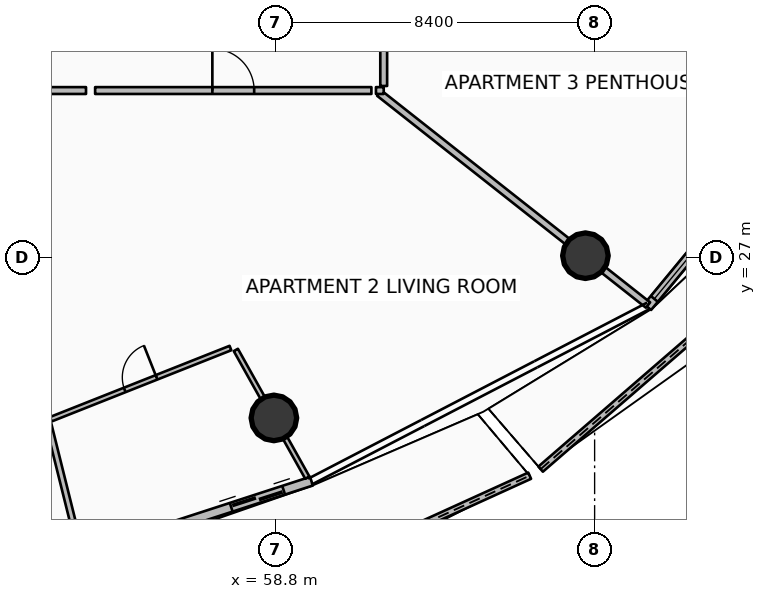
"""IFC4 building model, lengths in metres.
Left out: names, types, materials, properties, quantities, classifications, styles, units other than length and angle.
Written with IfcOpenShell. Run it as: python <this file> out.ifc"""

import sys

from ifc_helpers import new_model, si_unit, direction, frame, frame_2d, origin, origin_2d, place, context, subcontext, project, spatial, polyline, rectangle, circle, outline, extrude, element, fill, save


model = new_model("IFC4")
c1 = context("Model", 3, precision=1e-05, world=origin(), true_north=direction((0.0, 1.0)))
c2 = subcontext(c1, "Body", "Model", "MODEL_VIEW")
j1 = project(units=[si_unit("LENGTHUNIT", "METRE"), si_unit("PLANEANGLEUNIT", "RADIAN")], contexts=[c1])
p1 = place(None, origin())
s1 = spatial("IfcSite", under=j1, at=p1, CompositionType="ELEMENT")
p2 = place(p1, origin())
s2 = spatial("IfcBuilding", under=s1, at=p2, CompositionType="ELEMENT")
p3 = place(p2, frame((0.0, 0.0, 105.15)))
s3 = spatial("IfcBuildingStorey", under=s2, at=p3, CompositionType="ELEMENT", Elevation=105.15)
for number, where, z_axis, x_axis in (
    (1, (58.76, 22.786, 0.0), (0.0, 0.0, 1.0), (1.0, 0.0, 0.0)),
    (2, (66.958, 27.055, 0.0), (0.0, 0.0, 1.0), (1.0, 0.0, 0.0)),
):
    element("IfcColumn", number, at=place(p3, frame(where, z_axis=z_axis, x_axis=x_axis)), inside=s3, PredefinedType="COLUMN", context=c2, shape_type="SweptSolid", body=[
        extrude(circle(Radius=0.6, at=origin_2d()), origin(), (0.0, 0.0, 1.0), 3.5),
    ])
p4 = place(p3, frame((56.231, 17.053, 0.0), z_axis=(0.0, 0.0, 1.0), x_axis=(0.910226702808, 0.41411031078, 0.0)))
e3 = element("IfcWall", 3, at=p4, inside=s3, PredefinedType="PARAPET", context=c2, shape_type="SweptSolid", body=[
    extrude(outline(polyline([(0.0, 0.0), (10.173, 0.0), (10.173, 1.497), (5.086, 1.696), (0.0, 1.832), (0.0, 0.0)])), frame((0.0, 0.09, 0.0), z_axis=(0.0, -1.0, 0.0), x_axis=(1.0, 0.0, 0.0)), (0.0, 0.0, 1.0), 0.18),
])
p5 = place(p3, frame((65.78, 21.438, 0.0), z_axis=(0.0, 0.0, 1.0), x_axis=(0.756090126882, 0.654467508766, 0.0)))
e4 = element("IfcWall", 4, at=p5, inside=s3, PredefinedType="PARAPET", context=c2, shape_type="SweptSolid", body=[
    extrude(outline(polyline([(0.0, 0.0), (10.943, 0.0), (10.943, 1.148), (5.471, 1.284), (0.0, 1.483), (0.0, 0.0)])), frame((0.0, 0.09, 0.0), z_axis=(0.0, -1.0, 0.0), x_axis=(1.0, 0.0, 0.0)), (0.0, 0.0, 1.0), 0.18),
])
p6 = place(p3, frame((50.767, 18.203, 0.0), z_axis=(0.0, 0.0, 1.0), x_axis=(0.951052494852, 0.30902937083, 0.0)))
e5 = element("IfcWall", 5, at=p6, inside=s3, PredefinedType="SOLIDWALL", context=c2, shape_type="SweptSolid", body=[
    extrude(rectangle(XDim=9.444, YDim=0.24, at=frame_2d((4.722, 0.0))), origin(), (0.0, 0.0, 1.0), 2.45),
])
p7 = place(p6, frame((7.224, 0.0, 0.0)))
e6 = element("IfcOpeningElement", 6, at=p7, cuts=e5, PredefinedType="OPENING", context=c2, shape_type="SweptSolid", body=[
    extrude(rectangle(XDim=1.45, YDim=2.15, at=frame_2d((0.725, 1.075))), frame((0.0, 0.13, 0.0), z_axis=(0.0, -1.0, 0.0), x_axis=(1.0, 0.0, 0.0)), (0.0, 0.0, 1.0), 0.26),
])
p8 = place(p6, frame((0.28, 0.0, 0.65)))
e7 = element("IfcOpeningElement", 7, at=p8, cuts=e5, PredefinedType="OPENING", context=c2, shape_type="SweptSolid", body=[
    extrude(rectangle(XDim=1.6, YDim=1.5, at=frame_2d((0.8, 0.75))), frame((0.0, 0.13, 0.0), z_axis=(0.0, -1.0, 0.0), x_axis=(1.0, 0.0, 0.0)), (0.0, 0.0, 1.0), 0.26),
])
p9 = place(p3, frame((68.593, 25.702, 0.0), z_axis=(0.0, 0.0, 1.0), x_axis=(0.636704975, 0.771107498868, 0.0)))
e8 = element("IfcWall", 8, at=p9, inside=s3, PredefinedType="SOLIDWALL", context=c2, shape_type="SweptSolid", body=[
    extrude(rectangle(XDim=11.084, YDim=0.24, at=frame_2d((5.542, 0.0))), origin(), (0.0, 0.0, 1.0), 2.45),
])
p10 = place(p9, frame((8.864, 0.0, 0.0)))
e9 = element("IfcOpeningElement", 9, at=p10, cuts=e8, PredefinedType="OPENING", context=c2, shape_type="SweptSolid", body=[
    extrude(rectangle(XDim=1.45, YDim=2.15, at=frame_2d((0.725, 1.075))), frame((0.0, 0.13, 0.0), z_axis=(0.0, -1.0, 0.0), x_axis=(1.0, 0.0, 0.0)), (0.0, 0.0, 1.0), 0.26),
])
p11 = place(p9, frame((0.28, 0.0, 0.65)))
e10 = element("IfcOpeningElement", 10, at=p11, cuts=e8, PredefinedType="OPENING", context=c2, shape_type="SweptSolid", body=[
    extrude(rectangle(XDim=1.6, YDim=1.5, at=frame_2d((0.8, 0.75))), frame((0.0, 0.13, 0.0), z_axis=(0.0, -1.0, 0.0), x_axis=(1.0, 0.0, 0.0)), (0.0, 0.0, 1.0), 0.26),
])
p12 = place(p3, frame((61.532, 31.332, 0.0), z_axis=(0.0, 0.0, 1.0), x_axis=(0.785307944478, -0.619105348337, 0.0)))
e11 = element("IfcWall", 11, at=p12, inside=s3, PredefinedType="PARTITIONING", context=c2, shape_type="SweptSolid", body=[
    extrude(rectangle(XDim=9.006, YDim=0.18, at=frame_2d((4.503, 0.0))), origin(), (0.0, 0.0, 1.0), 2.94),
])
p13 = place(p3, frame((54.056, 31.4, 0.0), z_axis=(0.0, 0.0, 1.0), x_axis=(1.0, 0.0, 0.0)))
e12 = element("IfcWall", 12, at=p13, inside=s3, PredefinedType="PARTITIONING", context=c2, shape_type="SweptSolid", body=[
    extrude(rectangle(XDim=7.27, YDim=0.18, at=frame_2d((3.635, 0.0))), origin(), (0.0, 0.0, 1.0), 2.94),
])
p14 = place(p13, frame((3.085, 0.0, 0.0)))
e13 = element("IfcOpeningElement", 13, at=p14, cuts=e12, PredefinedType="OPENING", context=c2, shape_type="SweptSolid", body=[
    extrude(rectangle(XDim=1.1, YDim=2.1, at=frame_2d((0.55, 1.05))), frame((0.0, 0.1, 0.0), z_axis=(0.0, -1.0, 0.0), x_axis=(1.0, 0.0, 0.0)), (0.0, 0.0, 1.0), 0.2),
])
p15 = place(p3, frame((49.375, 31.4, 0.0), z_axis=(0.0, 0.0, 1.0), x_axis=(1.0, 0.0, 0.0)))
e14 = element("IfcWall", 14, at=p15, inside=s3, PredefinedType="PARTITIONING", context=c2, shape_type="SweptSolid", body=[
    extrude(rectangle(XDim=4.442, YDim=0.18, at=frame_2d((2.221, 0.0))), origin(), (0.0, 0.0, 1.0), 2.94),
])
p16 = place(p3, frame((57.759, 24.575, 0.0), z_axis=(0.0, 0.0, 1.0), x_axis=(0.488595646066, -0.87251034071, 0.0)))
e15 = element("IfcWall", 15, at=p16, inside=s3, PredefinedType="PARTITIONING", context=c2, shape_type="SweptSolid", body=[
    extrude(rectangle(XDim=3.851, YDim=0.125, at=frame_2d((1.925, 0.0))), origin(), (0.0, 0.0, 1.0), 2.94),
])
p17 = place(p3, frame((52.828, 22.631, 0.0), z_axis=(0.0, 0.0, 1.0), x_axis=(0.241821205531, -0.970320825581, 0.0)))
e16 = element("IfcWall", 16, at=p17, inside=s3, PredefinedType="PARTITIONING", context=c2, shape_type="SweptSolid", body=[
    extrude(rectangle(XDim=3.458, YDim=0.15, at=frame_2d((1.729, 0.0))), origin(), (0.0, 0.0, 1.0), 2.94),
])
p18 = place(p3, frame((52.889, 22.751, 0.0), z_axis=(0.0, 0.0, 1.0), x_axis=(0.929640857273, 0.368466927266, 0.0)))
e17 = element("IfcWall", 17, at=p18, inside=s3, PredefinedType="PARTITIONING", context=c2, shape_type="SweptSolid", body=[
    extrude(rectangle(XDim=5.085, YDim=0.125, at=frame_2d((2.543, 0.0))), origin(), (0.0, 0.0, 1.0), 2.94),
])
p19 = place(p18, frame((2.093, 0.0, 0.0)))
e18 = element("IfcOpeningElement", 18, at=p19, cuts=e17, PredefinedType="OPENING", context=c2, shape_type="SweptSolid", body=[
    extrude(rectangle(XDim=0.9, YDim=2.08, at=frame_2d((0.45, 1.04))), frame((0.0, 0.073, 0.0), z_axis=(0.0, -1.0, 0.0), x_axis=(1.0, 0.0, 0.0)), (0.0, 0.0, 1.0), 0.145),
])
p20 = place(p3, frame((61.446, 31.4, 0.0), z_axis=(0.0, 0.0, 1.0), x_axis=(1.0, 0.0, 0.0)))
e19 = element("IfcWall", 19, at=p20, inside=s3, PredefinedType="PARTITIONING", context=c2, shape_type="SweptSolid", body=[
    extrude(rectangle(XDim=0.204, YDim=0.18, at=frame_2d((0.102, 0.0))), origin(), (0.0, 0.0, 1.0), 2.94),
])
p21 = place(p3, frame((61.65, 31.52, 0.0), z_axis=(0.0, 0.0, 1.0), x_axis=(0.0, 1.0, 0.0)))
e20 = element("IfcWall", 20, at=p21, inside=s3, PredefinedType="PARTITIONING", context=c2, shape_type="SweptSolid", body=[
    extrude(rectangle(XDim=6.51, YDim=0.18, at=frame_2d((3.255, 0.0))), origin(), (0.0, 0.0, 1.0), 2.94),
])
p22 = place(p21, frame((2.705, 0.0, 0.0)))
e21 = element("IfcOpeningElement", 21, at=p22, cuts=e20, PredefinedType="OPENING", context=c2, shape_type="SweptSolid", body=[
    extrude(rectangle(XDim=1.1, YDim=2.1, at=frame_2d((0.55, 1.05))), frame((0.0, 0.1, 0.0), z_axis=(0.0, -1.0, 0.0), x_axis=(1.0, 0.0, 0.0)), (0.0, 0.0, 1.0), 0.2),
])
p23 = place(p7, origin())
e22 = element("IfcDoor", 22, at=p23, inside=s3, OperationType="DOUBLE_DOOR_SLIDING", PredefinedType="DOOR", context=c2, shape_type="SweptSolid", body=[
    extrude(rectangle(XDim=1.45, YDim=2.15, at=frame_2d((0.725, 1.075))), frame((0.0, 0.025, 0.0), z_axis=(0.0, -1.0, 0.0), x_axis=(1.0, 0.0, 0.0)), (0.0, 0.0, 1.0), 0.05),
])
fill(e6, e22)
p24 = place(p11, origin())
e23 = element("IfcWindow", 23, at=p24, inside=s3, PartitioningType="SINGLE_PANEL", PredefinedType="WINDOW", context=c2, shape_type="SweptSolid", body=[
    extrude(rectangle(XDim=1.6, YDim=1.5, at=frame_2d((0.8, 0.75))), frame((0.0, 0.03, 0.0), z_axis=(0.0, -1.0, 0.0), x_axis=(1.0, 0.0, 0.0)), (0.0, 0.0, 1.0), 0.06),
])
fill(e10, e23)
p25 = place(p14, origin())
e24 = element("IfcDoor", 24, at=p25, inside=s3, OperationType="SINGLE_SWING_LEFT", PredefinedType="DOOR", context=c2, shape_type="SweptSolid", body=[
    extrude(rectangle(XDim=1.1, YDim=2.1, at=frame_2d((0.55, 1.05))), frame((0.0, 0.025, 0.0), z_axis=(0.0, -1.0, 0.0), x_axis=(1.0, 0.0, 0.0)), (0.0, 0.0, 1.0), 0.05),
])
fill(e13, e24)
p26 = place(p19, origin())
e25 = element("IfcDoor", 25, at=p26, inside=s3, OperationType="SINGLE_SWING_RIGHT", PredefinedType="DOOR", context=c2, shape_type="SweptSolid", body=[
    extrude(rectangle(XDim=0.9, YDim=2.08, at=frame_2d((0.45, 1.04))), frame((0.0, 0.025, 0.0), z_axis=(0.0, -1.0, 0.0), x_axis=(1.0, 0.0, 0.0)), (0.0, 0.0, 1.0), 0.05),
])
fill(e18, e25)
save(model, sys.argv[1])
